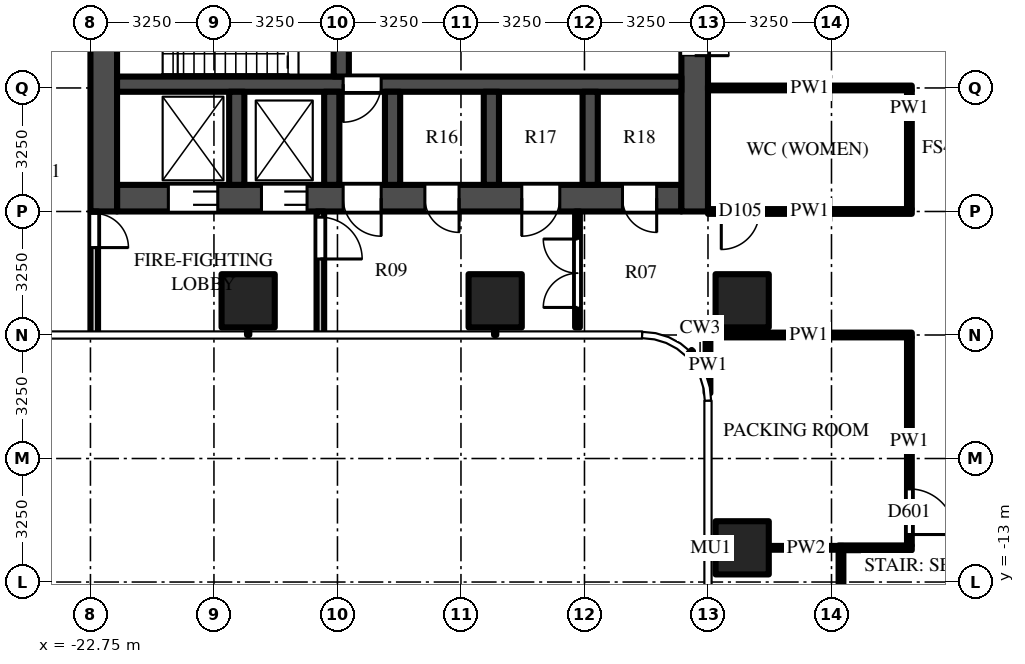
"""IFC4 building model, lengths in metres.
Left out: names, types, materials, properties, quantities, classifications, styles, units other than length and angle.
Written with IfcOpenShell. Run it as: python <this file> out.ifc"""

import sys

from ifc_helpers import new_model, si_unit, direction, frame, frame_2d, origin, origin_2d, place, context, subcontext, project, spatial, rectangle, extrude, source, transform, mapped, element, fill, save


model = new_model("IFC4")
c1 = context("Model", 3, precision=1e-05, world=origin(), true_north=direction((0.0, 1.0)))
c2 = subcontext(c1, "Body", "Model", "MODEL_VIEW")
j1 = project(units=[si_unit("LENGTHUNIT", "METRE"), si_unit("PLANEANGLEUNIT", "RADIAN")], contexts=[c1])
p1 = place(None, origin())
s1 = spatial("IfcSite", under=j1, at=p1, CompositionType="ELEMENT")
p2 = place(p1, origin())
s2 = spatial("IfcBuilding", under=s1, at=p2, CompositionType="ELEMENT")
p3 = place(p2, frame((0.0, 0.0, 61.0)))
s3 = spatial("IfcBuildingStorey", under=s2, at=p3, CompositionType="ELEMENT", Elevation=61.0)
m1 = source(origin(), c2, "Body", "SweptSolid", [
    extrude(rectangle(XDim=1.4, YDim=1.4, at=origin_2d()), origin(), (0.0, 0.0, 1.0), 4.5),
])
for number, where, z_axis, x_axis in (
    (1, (-5.6, -5.6, 0.0), (0.0, 0.0, 1.0), (1.0, 0.0, 0.0)),
    (2, (-5.6, -12.1, 0.0), (0.0, 0.0, 1.0), (1.0, 0.0, 0.0)),
    (3, (-12.1, -5.6, 0.0), (0.0, 0.0, 1.0), (1.0, 0.0, 0.0)),
    (4, (-18.6, -5.6, 0.0), (0.0, 0.0, 1.0), (1.0, 0.0, 0.0)),
):
    element("IfcColumn", number, at=place(p3, frame(where, z_axis=z_axis, x_axis=x_axis)), inside=s3, PredefinedType="COLUMN", context=c2, shape_type="MappedRepresentation", body=[
        mapped(m1, transform((0.0, 0.0, 0.0))),
    ])
m2 = source(origin(), c2, "Body", "SweptSolid", [
    extrude(rectangle(XDim=14.85, YDim=0.7, at=frame_2d((7.425, 0.0))), origin(), (0.0, 0.0, 1.0), 4.25),
])
p4 = place(p3, frame((-7.2, -2.9, 0.0), z_axis=(0.0, 0.0, 1.0), x_axis=(-1.0, 0.0, 0.0)))
e5 = element("IfcWall", 5, at=p4, inside=s3, PredefinedType="SHEAR", context=c2, shape_type="MappedRepresentation", body=[
    mapped(m2, transform((0.0, 0.0, 0.0))),
])
m3 = source(origin(), c2, "Body", "SweptSolid", [
    extrude(rectangle(XDim=1.3, YDim=2.1, at=frame_2d((0.65, 1.05))), frame((0.0, 0.36, 0.0), z_axis=(0.0, -1.0, 0.0), x_axis=(1.0, 0.0, 0.0)), (0.0, 0.0, 1.0), 0.72),
])
p5 = place(p4, frame((12.2, 0.0, 0.0)))
e6 = element("IfcOpeningElement", 6, at=p5, cuts=e5, PredefinedType="OPENING", context=c2, shape_type="MappedRepresentation", body=[
    mapped(m3, transform((0.0, 0.0, 0.0))),
])
m4 = source(origin(), c2, "Body", "SweptSolid", [
    extrude(rectangle(XDim=1.2, YDim=2.1, at=frame_2d((0.6, 1.05))), frame((0.0, 0.36, 0.0), z_axis=(0.0, -1.0, 0.0), x_axis=(1.0, 0.0, 0.0)), (0.0, 0.0, 1.0), 0.72),
])
p6 = place(p4, frame((9.85, 0.0, 0.0)))
e7 = element("IfcOpeningElement", 7, at=p6, cuts=e5, PredefinedType="OPENING", context=c2, shape_type="MappedRepresentation", body=[
    mapped(m4, transform((0.0, 0.0, 0.0))),
])
m5 = source(origin(), c2, "Body", "SweptSolid", [
    extrude(rectangle(XDim=1.0, YDim=2.1, at=frame_2d((0.5, 1.05))), frame((0.0, 0.36, 0.0), z_axis=(0.0, -1.0, 0.0), x_axis=(1.0, 0.0, 0.0)), (0.0, 0.0, 1.0), 0.72),
])
p7 = place(p4, frame((7.9, 0.0, 0.0)))
e8 = element("IfcOpeningElement", 8, at=p7, cuts=e5, PredefinedType="OPENING", context=c2, shape_type="MappedRepresentation", body=[
    mapped(m5, transform((0.0, 0.0, 0.0))),
])
m6 = source(origin(), c2, "Body", "SweptSolid", [
    extrude(rectangle(XDim=0.9, YDim=2.1, at=frame_2d((0.45, 1.05))), frame((0.0, 0.36, 0.0), z_axis=(0.0, -1.0, 0.0), x_axis=(1.0, 0.0, 0.0)), (0.0, 0.0, 1.0), 0.72),
])
p8 = place(p4, frame((0.65, 0.0, 0.0)))
e9 = element("IfcOpeningElement", 9, at=p8, cuts=e5, PredefinedType="OPENING", context=c2, shape_type="MappedRepresentation", body=[
    mapped(m6, transform((0.0, 0.0, 0.0))),
])
p9 = place(p4, frame((3.2, 0.0, 0.0)))
e10 = element("IfcOpeningElement", 10, at=p9, cuts=e5, PredefinedType="OPENING", context=c2, shape_type="MappedRepresentation", body=[
    mapped(m5, transform((0.0, 0.0, 0.0))),
])
p10 = place(p4, frame((5.85, 0.0, 0.0)))
e11 = element("IfcOpeningElement", 11, at=p10, cuts=e5, PredefinedType="OPENING", context=c2, shape_type="MappedRepresentation", body=[
    mapped(m6, transform((0.0, 0.0, 0.0))),
])
m7 = source(origin(), c2, "Body", "SweptSolid", [
    extrude(rectangle(XDim=9.05, YDim=0.7, at=frame_2d((4.525, 0.0))), origin(), (0.0, 0.0, 1.0), 4.25),
])
p11 = place(p3, frame((-6.85, 5.8, 0.0), z_axis=(0.0, 0.0, 1.0), x_axis=(0.0, -1.0, 0.0)))
e12 = element("IfcWall", 12, at=p11, inside=s3, PredefinedType="SHEAR", context=c2, shape_type="MappedRepresentation", body=[
    mapped(m7, transform((0.0, 0.0, 0.0))),
])
m8 = source(origin(), c2, "Body", "SweptSolid", [
    extrude(rectangle(XDim=1.8, YDim=2.1, at=frame_2d((0.9, 1.05))), frame((0.0, 0.36, 0.0), z_axis=(0.0, -1.0, 0.0), x_axis=(1.0, 0.0, 0.0)), (0.0, 0.0, 1.0), 0.72),
])
p12 = place(p11, frame((3.15, 0.0, 0.0)))
e13 = element("IfcOpeningElement", 13, at=p12, cuts=e12, PredefinedType="OPENING", context=c2, shape_type="MappedRepresentation", body=[
    mapped(m8, transform((0.0, 0.0, 0.0))),
])
p13 = place(p3, frame((-22.4, 5.8, 0.0), z_axis=(0.0, 0.0, 1.0), x_axis=(0.0, -1.0, 0.0)))
e14 = element("IfcWall", 14, at=p13, inside=s3, PredefinedType="SHEAR", context=c2, shape_type="MappedRepresentation", body=[
    mapped(m7, transform((0.0, 0.0, 0.0))),
])
m9 = source(origin(), c2, "Body", "SweptSolid", [
    extrude(rectangle(XDim=14.85, YDim=0.4, at=frame_2d((7.425, 0.0))), origin(), (0.0, 0.0, 1.0), 4.25),
])
p14 = place(p3, frame((-7.2, 0.1, 0.0), z_axis=(0.0, 0.0, 1.0), x_axis=(-1.0, 0.0, 0.0)))
e15 = element("IfcWall", 15, at=p14, inside=s3, PredefinedType="SHEAR", context=c2, shape_type="MappedRepresentation", body=[
    mapped(m9, transform((0.0, 0.0, 0.0))),
])
m10 = source(origin(), c2, "Body", "SweptSolid", [
    extrude(rectangle(XDim=1.0, YDim=2.1, at=frame_2d((0.5, 1.05))), frame((0.0, 0.21, 0.0), z_axis=(0.0, -1.0, 0.0), x_axis=(1.0, 0.0, 0.0)), (0.0, 0.0, 1.0), 0.42),
])
p15 = place(p14, frame((7.9, 0.0, 0.0)))
e16 = element("IfcOpeningElement", 16, at=p15, cuts=e15, PredefinedType="OPENING", context=c2, shape_type="MappedRepresentation", body=[
    mapped(m10, transform((0.0, 0.0, 0.0))),
])
m11 = source(origin(), c2, "Body", "SweptSolid", [
    extrude(rectangle(XDim=5.5, YDim=0.4, at=frame_2d((2.75, 0.0))), origin(), (0.0, 0.0, 1.0), 4.25),
])
p16 = place(p3, frame((-16.15, 5.8, 0.0), z_axis=(0.0, 0.0, 1.0), x_axis=(0.0, -1.0, 0.0)))
e17 = element("IfcWall", 17, at=p16, inside=s3, PredefinedType="SHEAR", context=c2, shape_type="MappedRepresentation", body=[
    mapped(m11, transform((0.0, 0.0, 0.0))),
])
m12 = source(origin(), c2, "Body", "SweptSolid", [
    extrude(rectangle(XDim=1.1, YDim=2.1, at=frame_2d((0.55, 1.05))), frame((0.0, 0.21, 0.0), z_axis=(0.0, -1.0, 0.0), x_axis=(1.0, 0.0, 0.0)), (0.0, 0.0, 1.0), 0.42),
])
p17 = place(p16, frame((0.725, 0.0, 0.0)))
e18 = element("IfcOpeningElement", 18, at=p17, cuts=e17, PredefinedType="OPENING", context=c2, shape_type="MappedRepresentation", body=[
    mapped(m12, transform((0.0, 0.0, 0.0))),
])
p18 = place(p16, frame((3.675, 0.0, 0.0)))
e19 = element("IfcOpeningElement", 19, at=p18, cuts=e17, PredefinedType="OPENING", context=c2, shape_type="MappedRepresentation", body=[
    mapped(m12, transform((0.0, 0.0, 0.0))),
])
m13 = source(origin(), c2, "Body", "SweptSolid", [
    extrude(rectangle(XDim=2.45, YDim=0.4, at=frame_2d((1.225, 0.0))), origin(), (0.0, 0.0, 1.0), 4.25),
])
for number, where, z_axis, x_axis in (
    (20, (-9.6, -0.1, 0.0), (0.0, 0.0, 1.0), (0.0, -1.0, 0.0)),
    (21, (-12.2, -0.1, 0.0), (0.0, 0.0, 1.0), (0.0, -1.0, 0.0)),
    (22, (-14.8, -0.1, 0.0), (0.0, 0.0, 1.0), (0.0, -1.0, 0.0)),
    (23, (-16.4, -0.1, 0.0), (0.0, 0.0, 1.0), (0.0, -1.0, 0.0)),
    (24, (-18.9, -0.1, 0.0), (0.0, 0.0, 1.0), (0.0, -1.0, 0.0)),
):
    element("IfcWall", number, at=place(p3, frame(where, z_axis=z_axis, x_axis=x_axis)), inside=s3, PredefinedType="SHEAR", context=c2, shape_type="MappedRepresentation", body=[
        mapped(m13, transform((0.0, 0.0, 0.0))),
    ])
m14 = source(origin(), c2, "Body", "SweptSolid", [
    extrude(rectangle(XDim=3.25, YDim=0.2, at=frame_2d((1.625, 0.0))), origin(), (0.0, 0.0, 1.0), 4.25),
])
p19 = place(p3, frame((-16.7, -3.25, 0.0), z_axis=(0.0, 0.0, 1.0), x_axis=(0.0, -1.0, 0.0)))
e25 = element("IfcWall", 25, at=p19, inside=s3, PredefinedType="PARTITIONING", context=c2, shape_type="MappedRepresentation", body=[
    mapped(m14, transform((0.0, 0.0, 0.0))),
])
m15 = source(origin(), c2, "Body", "SweptSolid", [
    extrude(rectangle(XDim=1.1, YDim=2.1, at=frame_2d((0.55, 1.05))), frame((0.0, 0.11, 0.0), z_axis=(0.0, -1.0, 0.0), x_axis=(1.0, 0.0, 0.0)), (0.0, 0.0, 1.0), 0.22),
])
p20 = place(p19, frame((0.15, 0.0, 0.0)))
e26 = element("IfcOpeningElement", 26, at=p20, cuts=e25, PredefinedType="OPENING", context=c2, shape_type="MappedRepresentation", body=[
    mapped(m15, transform((0.0, 0.0, 0.0))),
])
p21 = place(p3, frame((-22.65, -3.25, 0.0), z_axis=(0.0, 0.0, 1.0), x_axis=(0.0, -1.0, 0.0)))
e27 = element("IfcWall", 27, at=p21, inside=s3, PredefinedType="PARTITIONING", context=c2, shape_type="MappedRepresentation", body=[
    mapped(m14, transform((0.0, 0.0, 0.0))),
])
m16 = source(origin(), c2, "Body", "SweptSolid", [
    extrude(rectangle(XDim=0.9, YDim=2.1, at=frame_2d((0.45, 1.05))), frame((0.0, 0.11, 0.0), z_axis=(0.0, -1.0, 0.0), x_axis=(1.0, 0.0, 0.0)), (0.0, 0.0, 1.0), 0.22),
])
p22 = place(p21, frame((0.05, 0.0, 0.0)))
e28 = element("IfcOpeningElement", 28, at=p22, cuts=e27, PredefinedType="OPENING", context=c2, shape_type="MappedRepresentation", body=[
    mapped(m16, transform((0.0, 0.0, 0.0))),
])
m17 = source(origin(), c2, "Body", "SweptSolid", [
    extrude(rectangle(XDim=3.05, YDim=0.125, at=frame_2d((1.525, 0.0))), origin(), (0.0, 0.0, 1.0), 3.33),
])
p23 = place(p3, frame((-9.934, -6.3, 0.0), z_axis=(0.0, 0.0, 1.0), x_axis=(0.0, 1.0, 0.0)))
e29 = element("IfcWall", 29, at=p23, inside=s3, PredefinedType="PARTITIONING", context=c2, shape_type="MappedRepresentation", body=[
    mapped(m17, transform((0.0, 0.0, 0.0))),
])
m18 = source(origin(), c2, "Body", "SweptSolid", [
    extrude(rectangle(XDim=1.8, YDim=2.1, at=frame_2d((0.9, 1.05))), frame((0.0, 0.073, 0.0), z_axis=(0.0, -1.0, 0.0), x_axis=(1.0, 0.0, 0.0)), (0.0, 0.0, 1.0), 0.145),
])
p24 = place(p23, frame((0.525, 0.0, 0.0)))
e30 = element("IfcOpeningElement", 30, at=p24, cuts=e29, PredefinedType="OPENING", context=c2, shape_type="MappedRepresentation", body=[
    mapped(m18, transform((0.0, 0.0, 0.0))),
])
m19 = source(origin(), c2, "Body", "SweptSolid", [
    extrude(rectangle(XDim=1.469, YDim=0.125, at=frame_2d((0.734, 0.0))), origin(), (0.0, 0.0, 1.0), 4.25),
])
p25 = place(p3, frame((-6.5, -6.562, 0.0), z_axis=(0.0, 0.0, 1.0), x_axis=(0.0, -1.0, 0.0)))
e31 = element("IfcWall", 31, at=p25, inside=s3, PredefinedType="PARTITIONING", context=c2, shape_type="MappedRepresentation", body=[
    mapped(m19, transform((0.0, 0.0, 0.0))),
])
m20 = source(origin(), c2, "Body", "SweptSolid", [
    extrude(rectangle(XDim=8.788, YDim=0.125, at=frame_2d((4.394, 0.0))), origin(), (0.0, 0.0, 1.0), 3.468),
])
p26 = place(p3, frame((-3.0, -20.938, 0.0), z_axis=(0.0, 0.0, 1.0), x_axis=(0.0, 1.0, 0.0)))
e32 = element("IfcWall", 32, at=p26, inside=s3, PredefinedType="PARTITIONING", context=c2, shape_type="MappedRepresentation", body=[
    mapped(m20, transform((0.0, 0.0, 0.0))),
])
m21 = source(origin(), c2, "Body", "SweptSolid", [
    extrude(rectangle(XDim=5.475, YDim=0.125, at=frame_2d((2.738, 0.0))), origin(), (0.0, 0.0, 1.0), 3.468),
])
p27 = place(p3, frame((-1.2, -6.562, 0.0), z_axis=(0.0, 0.0, 1.0), x_axis=(0.0, -1.0, 0.0)))
e33 = element("IfcWall", 33, at=p27, inside=s3, PredefinedType="PARTITIONING", context=c2, shape_type="MappedRepresentation", body=[
    mapped(m21, transform((0.0, 0.0, 0.0))),
])
m22 = source(origin(), c2, "Body", "SweptSolid", [
    extrude(rectangle(XDim=1.2, YDim=2.1, at=frame_2d((0.6, 1.05))), frame((0.0, 0.073, 0.0), z_axis=(0.0, -1.0, 0.0), x_axis=(1.0, 0.0, 0.0)), (0.0, 0.0, 1.0), 0.145),
])
p28 = place(p27, frame((3.988, 0.0, 0.0)))
e34 = element("IfcOpeningElement", 34, at=p28, cuts=e33, PredefinedType="OPENING", context=c2, shape_type="MappedRepresentation", body=[
    mapped(m22, transform((0.0, 0.0, 0.0))),
])
m23 = source(origin(), c2, "Body", "SweptSolid", [
    extrude(rectangle(XDim=3.125, YDim=0.125, at=frame_2d((1.562, 0.0))), origin(), (0.0, 0.0, 1.0), 3.546),
])
p29 = place(p3, frame((-1.2, -0.062, 0.0), z_axis=(0.0, 0.0, 1.0), x_axis=(0.0, -1.0, 0.0)))
e35 = element("IfcWall", 35, at=p29, inside=s3, PredefinedType="PARTITIONING", context=c2, shape_type="MappedRepresentation", body=[
    mapped(m23, transform((0.0, 0.0, 0.0))),
])
m24 = source(origin(), c2, "Body", "SweptSolid", [
    extrude(rectangle(XDim=1.962, YDim=0.1, at=frame_2d((0.981, 0.0))), origin(), (0.0, 0.0, 1.0), 3.468),
])
p30 = place(p3, frame((-4.9, -12.1, 0.0), z_axis=(0.0, 0.0, 1.0), x_axis=(1.0, 0.0, 0.0)))
e36 = element("IfcWall", 36, at=p30, inside=s3, PredefinedType="PARTITIONING", context=c2, shape_type="MappedRepresentation", body=[
    mapped(m24, transform((0.0, 0.0, 0.0))),
])
m25 = source(origin(), c2, "Body", "SweptSolid", [
    extrude(rectangle(XDim=1.925, YDim=0.125, at=frame_2d((0.962, 0.0))), origin(), (0.0, 0.0, 1.0), 3.468),
])
p31 = place(p3, frame((-3.062, -12.1, 0.0), z_axis=(0.0, 0.0, 1.0), x_axis=(1.0, 0.0, 0.0)))
e37 = element("IfcWall", 37, at=p31, inside=s3, PredefinedType="PARTITIONING", context=c2, shape_type="MappedRepresentation", body=[
    mapped(m25, transform((0.0, 0.0, 0.0))),
])
m26 = source(origin(), c2, "Body", "SweptSolid", [
    extrude(rectangle(XDim=5.425, YDim=0.125, at=frame_2d((2.712, 0.0))), origin(), (0.0, 0.0, 1.0), 3.33),
])
p32 = place(p3, frame((-1.137, -6.5, 0.0), z_axis=(0.0, 0.0, 1.0), x_axis=(-1.0, 0.0, 0.0)))
e38 = element("IfcWall", 38, at=p32, inside=s3, PredefinedType="PARTITIONING", context=c2, shape_type="MappedRepresentation", body=[
    mapped(m26, transform((0.0, 0.0, 0.0))),
])
m27 = source(origin(), c2, "Body", "SweptSolid", [
    extrude(rectangle(XDim=5.363, YDim=0.125, at=frame_2d((2.681, 0.0))), origin(), (0.0, 0.0, 1.0), 3.468),
])
p33 = place(p3, frame((-1.137, -3.25, 0.0), z_axis=(0.0, 0.0, 1.0), x_axis=(-1.0, 0.0, 0.0)))
e39 = element("IfcWall", 39, at=p33, inside=s3, PredefinedType="PARTITIONING", context=c2, shape_type="MappedRepresentation", body=[
    mapped(m27, transform((0.0, 0.0, 0.0))),
])
m28 = source(origin(), c2, "Body", "SweptSolid", [
    extrude(rectangle(XDim=1.0, YDim=2.1, at=frame_2d((0.5, 1.05))), frame((0.0, 0.073, 0.0), z_axis=(0.0, -1.0, 0.0), x_axis=(1.0, 0.0, 0.0)), (0.0, 0.0, 1.0), 0.145),
])
p34 = place(p33, frame((4.012, 0.0, 0.0)))
e40 = element("IfcOpeningElement", 40, at=p34, cuts=e39, PredefinedType="OPENING", context=c2, shape_type="MappedRepresentation", body=[
    mapped(m28, transform((0.0, 0.0, 0.0))),
])
p35 = place(p3, frame((-1.137, 0.0, 0.0), z_axis=(0.0, 0.0, 1.0), x_axis=(-1.0, 0.0, 0.0)))
e41 = element("IfcWall", 41, at=p35, inside=s3, PredefinedType="PARTITIONING", context=c2, shape_type="MappedRepresentation", body=[
    mapped(m27, transform((0.0, 0.0, 0.0))),
])
m29 = source(origin(), c2, "Body", "SweptSolid", [
    extrude(rectangle(XDim=1.3, YDim=2.1, at=frame_2d((0.65, 1.05))), frame((0.0, -0.275, 0.0), z_axis=(0.0, -1.0, 0.0), x_axis=(1.0, 0.0, 0.0)), (0.0, 0.0, 1.0), 0.05),
])
p36 = place(p5, origin())
e42 = element("IfcDoor", 42, at=p36, inside=s3, OperationType="DOUBLE_DOOR_SLIDING", PredefinedType="DOOR", context=c2, shape_type="MappedRepresentation", body=[
    mapped(m29, transform((0.0, 0.0, 0.0))),
])
fill(e6, e42)
m30 = source(origin(), c2, "Body", "SweptSolid", [
    extrude(rectangle(XDim=1.2, YDim=2.1, at=frame_2d((0.6, 1.05))), frame((0.0, -0.275, 0.0), z_axis=(0.0, -1.0, 0.0), x_axis=(1.0, 0.0, 0.0)), (0.0, 0.0, 1.0), 0.05),
])
p37 = place(p6, origin())
e43 = element("IfcDoor", 43, at=p37, inside=s3, OperationType="DOUBLE_DOOR_SLIDING", PredefinedType="DOOR", context=c2, shape_type="MappedRepresentation", body=[
    mapped(m30, transform((0.0, 0.0, 0.0))),
])
fill(e7, e43)
m31 = source(origin(), c2, "Body", "SweptSolid", [
    extrude(rectangle(XDim=1.8, YDim=2.1, at=frame_2d((0.9, 1.05))), frame((0.0, -0.275, 0.0), z_axis=(0.0, -1.0, 0.0), x_axis=(1.0, 0.0, 0.0)), (0.0, 0.0, 1.0), 0.05),
])
p38 = place(p12, origin())
e44 = element("IfcDoor", 44, at=p38, inside=s3, OperationType="DOUBLE_DOOR_SINGLE_SWING", PredefinedType="DOOR", context=c2, shape_type="MappedRepresentation", body=[
    mapped(m31, transform((0.0, 0.0, 0.0))),
])
fill(e13, e44)
m32 = source(origin(), c2, "Body", "SweptSolid", [
    extrude(rectangle(XDim=1.0, YDim=2.1, at=frame_2d((0.5, 1.05))), frame((0.0, 0.025, 0.0), z_axis=(0.0, -1.0, 0.0), x_axis=(1.0, 0.0, 0.0)), (0.0, 0.0, 1.0), 0.05),
])
p39 = place(p15, origin())
e45 = element("IfcDoor", 45, at=p39, inside=s3, OperationType="SINGLE_SWING_RIGHT", PredefinedType="DOOR", context=c2, shape_type="MappedRepresentation", body=[
    mapped(m32, transform((0.0, 0.0, 0.0))),
])
fill(e16, e45)
m33 = source(origin(), c2, "Body", "SweptSolid", [
    extrude(rectangle(XDim=1.0, YDim=2.1, at=frame_2d((0.5, 1.05))), frame((0.0, -0.275, 0.0), z_axis=(0.0, -1.0, 0.0), x_axis=(1.0, 0.0, 0.0)), (0.0, 0.0, 1.0), 0.05),
])
p40 = place(p7, origin())
e46 = element("IfcDoor", 46, at=p40, inside=s3, OperationType="SINGLE_SWING_LEFT", PredefinedType="DOOR", context=c2, shape_type="MappedRepresentation", body=[
    mapped(m33, transform((0.0, 0.0, 0.0))),
])
fill(e8, e46)
m34 = source(origin(), c2, "Body", "SweptSolid", [
    extrude(rectangle(XDim=1.1, YDim=2.1, at=frame_2d((0.55, 1.05))), frame((0.0, 0.025, 0.0), z_axis=(0.0, -1.0, 0.0), x_axis=(1.0, 0.0, 0.0)), (0.0, 0.0, 1.0), 0.05),
])
p41 = place(p20, origin())
e47 = element("IfcDoor", 47, at=p41, inside=s3, OperationType="SINGLE_SWING_RIGHT", PredefinedType="DOOR", context=c2, shape_type="MappedRepresentation", body=[
    mapped(m34, transform((0.0, 0.0, 0.0))),
])
fill(e26, e47)
m35 = source(origin(), c2, "Body", "SweptSolid", [
    extrude(rectangle(XDim=0.9, YDim=2.1, at=frame_2d((0.45, 1.05))), frame((0.0, 0.025, 0.0), z_axis=(0.0, -1.0, 0.0), x_axis=(1.0, 0.0, 0.0)), (0.0, 0.0, 1.0), 0.05),
])
p42 = place(p22, origin())
e48 = element("IfcDoor", 48, at=p42, inside=s3, OperationType="SINGLE_SWING_RIGHT", PredefinedType="DOOR", context=c2, shape_type="MappedRepresentation", body=[
    mapped(m35, transform((0.0, 0.0, 0.0))),
])
fill(e28, e48)
m36 = source(origin(), c2, "Body", "SweptSolid", [
    extrude(rectangle(XDim=0.9, YDim=2.1, at=frame_2d((0.45, 1.05))), frame((0.0, -0.275, 0.0), z_axis=(0.0, -1.0, 0.0), x_axis=(1.0, 0.0, 0.0)), (0.0, 0.0, 1.0), 0.05),
])
p43 = place(p8, origin())
e49 = element("IfcDoor", 49, at=p43, inside=s3, OperationType="SINGLE_SWING_LEFT", PredefinedType="DOOR", context=c2, shape_type="MappedRepresentation", body=[
    mapped(m36, transform((0.0, 0.0, 0.0))),
])
fill(e9, e49)
p44 = place(p9, origin())
e50 = element("IfcDoor", 50, at=p44, inside=s3, OperationType="SINGLE_SWING_RIGHT", PredefinedType="DOOR", context=c2, shape_type="MappedRepresentation", body=[
    mapped(m33, transform((0.0, 0.0, 0.0))),
])
fill(e10, e50)
p45 = place(p10, origin())
e51 = element("IfcDoor", 51, at=p45, inside=s3, OperationType="SINGLE_SWING_LEFT", PredefinedType="DOOR", context=c2, shape_type="MappedRepresentation", body=[
    mapped(m36, transform((0.0, 0.0, 0.0))),
])
fill(e11, e51)
m37 = source(origin(), c2, "Body", "SweptSolid", [
    extrude(rectangle(XDim=1.2, YDim=2.1, at=frame_2d((0.6, 1.05))), frame((0.0, 0.025, 0.0), z_axis=(0.0, -1.0, 0.0), x_axis=(1.0, 0.0, 0.0)), (0.0, 0.0, 1.0), 0.05),
])
p46 = place(p28, origin())
e52 = element("IfcDoor", 52, at=p46, inside=s3, OperationType="SINGLE_SWING_RIGHT", PredefinedType="DOOR", context=c2, shape_type="MappedRepresentation", body=[
    mapped(m37, transform((0.0, 0.0, 0.0))),
])
fill(e34, e52)
m38 = source(origin(), c2, "Body", "SweptSolid", [
    extrude(rectangle(XDim=1.8, YDim=2.1, at=frame_2d((0.9, 1.05))), frame((0.0, 0.025, 0.0), z_axis=(0.0, -1.0, 0.0), x_axis=(1.0, 0.0, 0.0)), (0.0, 0.0, 1.0), 0.05),
])
p47 = place(p24, origin())
e53 = element("IfcDoor", 53, at=p47, inside=s3, OperationType="DOUBLE_DOOR_SINGLE_SWING", PredefinedType="DOOR", context=c2, shape_type="MappedRepresentation", body=[
    mapped(m38, transform((0.0, 0.0, 0.0))),
])
fill(e30, e53)
p48 = place(p34, origin())
e54 = element("IfcDoor", 54, at=p48, inside=s3, OperationType="SINGLE_SWING_RIGHT", PredefinedType="DOOR", context=c2, shape_type="MappedRepresentation", body=[
    mapped(m32, transform((0.0, 0.0, 0.0))),
])
fill(e40, e54)
save(model, sys.argv[1])
